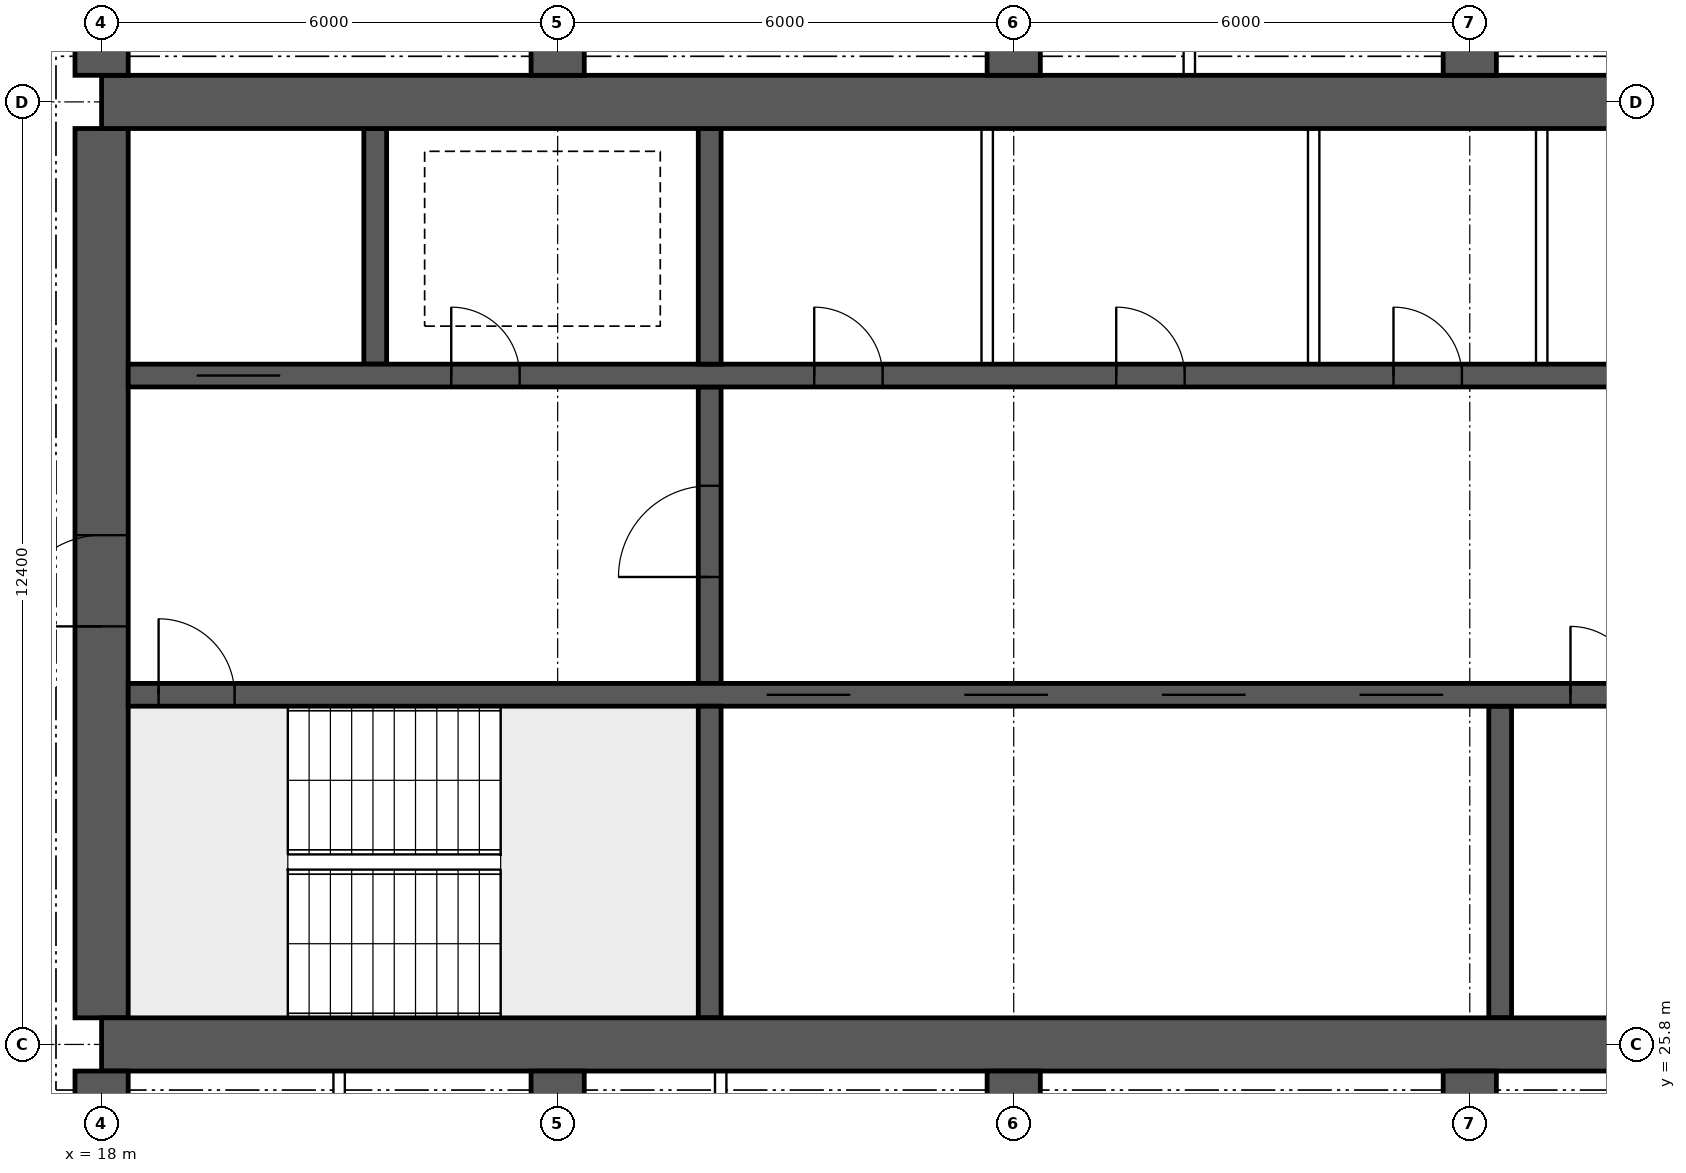
"""IFC4 building model, lengths in metres.
Left out: names, types, materials, properties, quantities, classifications, styles, units other than length and angle.
Written with IfcOpenShell. Run it as: python <this file> out.ifc"""

import sys

from ifc_helpers import new_model, si_unit, direction, frame, frame_2d, origin, place, context, subcontext, project, spatial, rectangle, extrude, element, fill, save


model = new_model("IFC4")
c1 = context("Model", 3, precision=1e-05, world=origin(), true_north=direction((0.0, 1.0)))
c2 = subcontext(c1, "Body", "Model", "MODEL_VIEW")
j1 = project(units=[si_unit("LENGTHUNIT", "METRE"), si_unit("PLANEANGLEUNIT", "RADIAN")], contexts=[c1])
p1 = place(None, origin())
s1 = spatial("IfcSite", under=j1, at=p1, CompositionType="ELEMENT")
p2 = place(p1, origin())
s2 = spatial("IfcBuilding", under=s1, at=p2, CompositionType="ELEMENT")
p3 = place(p2, frame((0.0, 0.0, 224.05)))
s3 = spatial("IfcBuildingStorey", under=s2, at=p3, CompositionType="ELEMENT", Elevation=224.05)
for number, where, z_axis, x_axis in (
    (1, (18.0, 25.8, 0.0), (0.0, 0.0, 1.0), (1.0, 0.0, 0.0)),
    (2, (18.0, 38.2, 0.0), (0.0, 0.0, 1.0), (1.0, 0.0, 0.0)),
):
    element("IfcWall", number, at=place(p3, frame(where, z_axis=z_axis, x_axis=x_axis)), inside=s3, PredefinedType="SHEAR", context=c2, shape_type="SweptSolid", body=[
        extrude(rectangle(XDim=48.0, YDim=0.7, at=frame_2d((24.0, 0.0))), origin(), (0.0, 0.0, 1.0), 3.75),
    ])
p4 = place(p3, frame((18.0, 26.15, 0.0), z_axis=(0.0, 0.0, 1.0), x_axis=(0.0, 1.0, 0.0)))
e3 = element("IfcWall", 3, at=p4, inside=s3, PredefinedType="SHEAR", context=c2, shape_type="SweptSolid", body=[
    extrude(rectangle(XDim=11.7, YDim=0.7, at=frame_2d((5.85, 0.0))), origin(), (0.0, 0.0, 1.0), 3.75),
])
p5 = place(p4, frame((5.15, 0.0, 0.0)))
e4 = element("IfcOpeningElement", 4, at=p5, cuts=e3, PredefinedType="OPENING", context=c2, shape_type="SweptSolid", body=[
    extrude(rectangle(XDim=1.2, YDim=2.1, at=frame_2d((0.6, 1.05))), frame((0.0, 0.36, 0.0), z_axis=(0.0, -1.0, 0.0), x_axis=(1.0, 0.0, 0.0)), (0.0, 0.0, 1.0), 0.72),
])
p6 = place(p3, frame((18.35, 30.4, 0.0), z_axis=(0.0, 0.0, 1.0), x_axis=(1.0, 0.0, 0.0)))
e5 = element("IfcWall", 5, at=p6, inside=s3, PredefinedType="SHEAR", context=c2, shape_type="SweptSolid", body=[
    extrude(rectangle(XDim=47.3, YDim=0.3, at=frame_2d((23.65, 0.0))), origin(), (0.0, 0.0, 1.0), 3.75),
])
p7 = place(p6, frame((0.4, 0.0, 0.0)))
e6 = element("IfcOpeningElement", 6, at=p7, cuts=e5, PredefinedType="OPENING", context=c2, shape_type="SweptSolid", body=[
    extrude(rectangle(XDim=1.0, YDim=2.1, at=frame_2d((0.5, 1.05))), frame((0.0, 0.16, 0.0), z_axis=(0.0, -1.0, 0.0), x_axis=(1.0, 0.0, 0.0)), (0.0, 0.0, 1.0), 0.32),
])
p8 = place(p6, frame((45.9, 0.0, 0.0)))
e7 = element("IfcOpeningElement", 7, at=p8, cuts=e5, PredefinedType="OPENING", context=c2, shape_type="SweptSolid", body=[
    extrude(rectangle(XDim=1.0, YDim=2.1, at=frame_2d((0.5, 1.05))), frame((0.0, 0.16, 0.0), z_axis=(0.0, -1.0, 0.0), x_axis=(1.0, 0.0, 0.0)), (0.0, 0.0, 1.0), 0.32),
])
p9 = place(p6, frame((8.4, 0.0, 0.0)))
e8 = element("IfcOpeningElement", 8, at=p9, cuts=e5, PredefinedType="OPENING", context=c2, shape_type="SweptSolid", body=[
    extrude(rectangle(XDim=1.1, YDim=2.1, at=frame_2d((0.55, 1.05))), frame((0.0, 0.16, 0.0), z_axis=(0.0, -1.0, 0.0), x_axis=(1.0, 0.0, 0.0)), (0.0, 0.0, 1.0), 0.32),
])
p10 = place(p6, frame((11.0, 0.0, 0.0)))
e9 = element("IfcOpeningElement", 9, at=p10, cuts=e5, PredefinedType="OPENING", context=c2, shape_type="SweptSolid", body=[
    extrude(rectangle(XDim=1.1, YDim=2.1, at=frame_2d((0.55, 1.05))), frame((0.0, 0.16, 0.0), z_axis=(0.0, -1.0, 0.0), x_axis=(1.0, 0.0, 0.0)), (0.0, 0.0, 1.0), 0.32),
])
p11 = place(p6, frame((13.6, 0.0, 0.0)))
e10 = element("IfcOpeningElement", 10, at=p11, cuts=e5, PredefinedType="OPENING", context=c2, shape_type="SweptSolid", body=[
    extrude(rectangle(XDim=1.1, YDim=2.1, at=frame_2d((0.55, 1.05))), frame((0.0, 0.16, 0.0), z_axis=(0.0, -1.0, 0.0), x_axis=(1.0, 0.0, 0.0)), (0.0, 0.0, 1.0), 0.32),
])
p12 = place(p6, frame((16.2, 0.0, 0.0)))
e11 = element("IfcOpeningElement", 11, at=p12, cuts=e5, PredefinedType="OPENING", context=c2, shape_type="SweptSolid", body=[
    extrude(rectangle(XDim=1.1, YDim=2.1, at=frame_2d((0.55, 1.05))), frame((0.0, 0.16, 0.0), z_axis=(0.0, -1.0, 0.0), x_axis=(1.0, 0.0, 0.0)), (0.0, 0.0, 1.0), 0.32),
])
p13 = place(p6, frame((18.975, 0.0, 0.0)))
e12 = element("IfcOpeningElement", 12, at=p13, cuts=e5, PredefinedType="OPENING", context=c2, shape_type="SweptSolid", body=[
    extrude(rectangle(XDim=0.9, YDim=2.1, at=frame_2d((0.45, 1.05))), frame((0.0, 0.16, 0.0), z_axis=(0.0, -1.0, 0.0), x_axis=(1.0, 0.0, 0.0)), (0.0, 0.0, 1.0), 0.32),
])
p14 = place(p6, frame((24.475, 0.0, 0.0)))
e13 = element("IfcOpeningElement", 13, at=p14, cuts=e5, PredefinedType="OPENING", context=c2, shape_type="SweptSolid", body=[
    extrude(rectangle(XDim=0.9, YDim=2.1, at=frame_2d((0.45, 1.05))), frame((0.0, 0.16, 0.0), z_axis=(0.0, -1.0, 0.0), x_axis=(1.0, 0.0, 0.0)), (0.0, 0.0, 1.0), 0.32),
])
p15 = place(p6, frame((30.267, 0.0, 0.0)))
e14 = element("IfcOpeningElement", 14, at=p15, cuts=e5, PredefinedType="OPENING", context=c2, shape_type="SweptSolid", body=[
    extrude(rectangle(XDim=1.1, YDim=2.1, at=frame_2d((0.55, 1.05))), frame((0.0, 0.16, 0.0), z_axis=(0.0, -1.0, 0.0), x_axis=(1.0, 0.0, 0.0)), (0.0, 0.0, 1.0), 0.32),
])
p16 = place(p6, frame((33.8, 0.0, 0.0)))
e15 = element("IfcOpeningElement", 15, at=p16, cuts=e5, PredefinedType="OPENING", context=c2, shape_type="SweptSolid", body=[
    extrude(rectangle(XDim=1.1, YDim=2.1, at=frame_2d((0.55, 1.05))), frame((0.0, 0.16, 0.0), z_axis=(0.0, -1.0, 0.0), x_axis=(1.0, 0.0, 0.0)), (0.0, 0.0, 1.0), 0.32),
])
p17 = place(p6, frame((37.333, 0.0, 0.0)))
e16 = element("IfcOpeningElement", 16, at=p17, cuts=e5, PredefinedType="OPENING", context=c2, shape_type="SweptSolid", body=[
    extrude(rectangle(XDim=1.1, YDim=2.1, at=frame_2d((0.55, 1.05))), frame((0.0, 0.16, 0.0), z_axis=(0.0, -1.0, 0.0), x_axis=(1.0, 0.0, 0.0)), (0.0, 0.0, 1.0), 0.32),
])
p18 = place(p3, frame((18.35, 34.6, 0.0), z_axis=(0.0, 0.0, 1.0), x_axis=(1.0, 0.0, 0.0)))
e17 = element("IfcWall", 17, at=p18, inside=s3, PredefinedType="SHEAR", context=c2, shape_type="SweptSolid", body=[
    extrude(rectangle(XDim=47.3, YDim=0.3, at=frame_2d((23.65, 0.0))), origin(), (0.0, 0.0, 1.0), 3.75),
])
p19 = place(p18, frame((0.9, 0.0, 0.0)))
e18 = element("IfcOpeningElement", 18, at=p19, cuts=e17, PredefinedType="OPENING", context=c2, shape_type="SweptSolid", body=[
    extrude(rectangle(XDim=1.1, YDim=2.1, at=frame_2d((0.55, 1.05))), frame((0.0, 0.16, 0.0), z_axis=(0.0, -1.0, 0.0), x_axis=(1.0, 0.0, 0.0)), (0.0, 0.0, 1.0), 0.32),
])
p20 = place(p18, frame((45.3, 0.0, 0.0)))
e19 = element("IfcOpeningElement", 19, at=p20, cuts=e17, PredefinedType="OPENING", context=c2, shape_type="SweptSolid", body=[
    extrude(rectangle(XDim=1.1, YDim=2.1, at=frame_2d((0.55, 1.05))), frame((0.0, 0.16, 0.0), z_axis=(0.0, -1.0, 0.0), x_axis=(1.0, 0.0, 0.0)), (0.0, 0.0, 1.0), 0.32),
])
p21 = place(p18, frame((4.25, 0.0, 0.0)))
e20 = element("IfcOpeningElement", 20, at=p21, cuts=e17, PredefinedType="OPENING", context=c2, shape_type="SweptSolid", body=[
    extrude(rectangle(XDim=0.9, YDim=2.1, at=frame_2d((0.45, 1.05))), frame((0.0, 0.16, 0.0), z_axis=(0.0, -1.0, 0.0), x_axis=(1.0, 0.0, 0.0)), (0.0, 0.0, 1.0), 0.32),
])
p22 = place(p18, frame((42.15, 0.0, 0.0)))
e21 = element("IfcOpeningElement", 21, at=p22, cuts=e17, PredefinedType="OPENING", context=c2, shape_type="SweptSolid", body=[
    extrude(rectangle(XDim=0.9, YDim=2.1, at=frame_2d((0.45, 1.05))), frame((0.0, 0.16, 0.0), z_axis=(0.0, -1.0, 0.0), x_axis=(1.0, 0.0, 0.0)), (0.0, 0.0, 1.0), 0.32),
])
p23 = place(p18, frame((9.025, 0.0, 0.0)))
e22 = element("IfcOpeningElement", 22, at=p23, cuts=e17, PredefinedType="OPENING", context=c2, shape_type="SweptSolid", body=[
    extrude(rectangle(XDim=0.9, YDim=2.1, at=frame_2d((0.45, 1.05))), frame((0.0, 0.16, 0.0), z_axis=(0.0, -1.0, 0.0), x_axis=(1.0, 0.0, 0.0)), (0.0, 0.0, 1.0), 0.32),
])
p24 = place(p18, frame((12.999, 0.0, 0.0)))
e23 = element("IfcOpeningElement", 23, at=p24, cuts=e17, PredefinedType="OPENING", context=c2, shape_type="SweptSolid", body=[
    extrude(rectangle(XDim=0.9, YDim=2.1, at=frame_2d((0.45, 1.05))), frame((0.0, 0.16, 0.0), z_axis=(0.0, -1.0, 0.0), x_axis=(1.0, 0.0, 0.0)), (0.0, 0.0, 1.0), 0.32),
])
p25 = place(p18, frame((16.646, 0.0, 0.0)))
e24 = element("IfcOpeningElement", 24, at=p25, cuts=e17, PredefinedType="OPENING", context=c2, shape_type="SweptSolid", body=[
    extrude(rectangle(XDim=0.9, YDim=2.1, at=frame_2d((0.45, 1.05))), frame((0.0, 0.16, 0.0), z_axis=(0.0, -1.0, 0.0), x_axis=(1.0, 0.0, 0.0)), (0.0, 0.0, 1.0), 0.32),
])
p26 = place(p18, frame((20.405, 0.0, 0.0)))
e25 = element("IfcOpeningElement", 25, at=p26, cuts=e17, PredefinedType="OPENING", context=c2, shape_type="SweptSolid", body=[
    extrude(rectangle(XDim=0.9, YDim=2.1, at=frame_2d((0.45, 1.05))), frame((0.0, 0.16, 0.0), z_axis=(0.0, -1.0, 0.0), x_axis=(1.0, 0.0, 0.0)), (0.0, 0.0, 1.0), 0.32),
])
p27 = place(p18, frame((24.811, 0.0, 0.0)))
e26 = element("IfcOpeningElement", 26, at=p27, cuts=e17, PredefinedType="OPENING", context=c2, shape_type="SweptSolid", body=[
    extrude(rectangle(XDim=0.9, YDim=2.1, at=frame_2d((0.45, 1.05))), frame((0.0, 0.16, 0.0), z_axis=(0.0, -1.0, 0.0), x_axis=(1.0, 0.0, 0.0)), (0.0, 0.0, 1.0), 0.32),
])
p28 = place(p18, frame((27.608, 0.0, 0.0)))
e27 = element("IfcOpeningElement", 27, at=p28, cuts=e17, PredefinedType="OPENING", context=c2, shape_type="SweptSolid", body=[
    extrude(rectangle(XDim=0.9, YDim=2.1, at=frame_2d((0.45, 1.05))), frame((0.0, 0.16, 0.0), z_axis=(0.0, -1.0, 0.0), x_axis=(1.0, 0.0, 0.0)), (0.0, 0.0, 1.0), 0.32),
])
p29 = place(p18, frame((29.575, 0.0, 0.0)))
e28 = element("IfcOpeningElement", 28, at=p29, cuts=e17, PredefinedType="OPENING", context=c2, shape_type="SweptSolid", body=[
    extrude(rectangle(XDim=0.9, YDim=2.1, at=frame_2d((0.45, 1.05))), frame((0.0, 0.16, 0.0), z_axis=(0.0, -1.0, 0.0), x_axis=(1.0, 0.0, 0.0)), (0.0, 0.0, 1.0), 0.32),
])
p30 = place(p18, frame((32.007, 0.0, 0.0)))
e29 = element("IfcOpeningElement", 29, at=p30, cuts=e17, PredefinedType="OPENING", context=c2, shape_type="SweptSolid", body=[
    extrude(rectangle(XDim=0.9, YDim=2.1, at=frame_2d((0.45, 1.05))), frame((0.0, 0.16, 0.0), z_axis=(0.0, -1.0, 0.0), x_axis=(1.0, 0.0, 0.0)), (0.0, 0.0, 1.0), 0.32),
])
p31 = place(p18, frame((34.742, 0.0, 0.0)))
e30 = element("IfcOpeningElement", 30, at=p31, cuts=e17, PredefinedType="OPENING", context=c2, shape_type="SweptSolid", body=[
    extrude(rectangle(XDim=0.9, YDim=2.1, at=frame_2d((0.45, 1.05))), frame((0.0, 0.16, 0.0), z_axis=(0.0, -1.0, 0.0), x_axis=(1.0, 0.0, 0.0)), (0.0, 0.0, 1.0), 0.32),
])
p32 = place(p18, frame((37.781, 0.0, 0.0)))
e31 = element("IfcOpeningElement", 31, at=p32, cuts=e17, PredefinedType="OPENING", context=c2, shape_type="SweptSolid", body=[
    extrude(rectangle(XDim=0.9, YDim=2.1, at=frame_2d((0.45, 1.05))), frame((0.0, 0.16, 0.0), z_axis=(0.0, -1.0, 0.0), x_axis=(1.0, 0.0, 0.0)), (0.0, 0.0, 1.0), 0.32),
])
p33 = place(p3, frame((26.0, 26.15, 0.0), z_axis=(0.0, 0.0, 1.0), x_axis=(0.0, 1.0, 0.0)))
e32 = element("IfcWall", 32, at=p33, inside=s3, PredefinedType="SHEAR", context=c2, shape_type="SweptSolid", body=[
    extrude(rectangle(XDim=4.1, YDim=0.3, at=frame_2d((2.05, 0.0))), origin(), (0.0, 0.0, 1.0), 3.75),
])
p34 = place(p3, frame((26.0, 30.55, 0.0), z_axis=(0.0, 0.0, 1.0), x_axis=(0.0, 1.0, 0.0)))
e33 = element("IfcWall", 33, at=p34, inside=s3, PredefinedType="SHEAR", context=c2, shape_type="SweptSolid", body=[
    extrude(rectangle(XDim=3.9, YDim=0.3, at=frame_2d((1.95, 0.0))), origin(), (0.0, 0.0, 1.0), 3.75),
])
p35 = place(p34, frame((1.4, 0.0, 0.0)))
e34 = element("IfcOpeningElement", 34, at=p35, cuts=e33, PredefinedType="OPENING", context=c2, shape_type="SweptSolid", body=[
    extrude(rectangle(XDim=1.2, YDim=2.1, at=frame_2d((0.6, 1.05))), frame((0.0, 0.16, 0.0), z_axis=(0.0, -1.0, 0.0), x_axis=(1.0, 0.0, 0.0)), (0.0, 0.0, 1.0), 0.32),
])
for number, where, z_axis, x_axis in (
    (35, (21.6, 34.75, 0.0), (0.0, 0.0, 1.0), (0.0, 1.0, 0.0)),
    (36, (26.0, 34.75, 0.0), (0.0, 0.0, 1.0), (0.0, 1.0, 0.0)),
):
    element("IfcWall", number, at=place(p3, frame(where, z_axis=z_axis, x_axis=x_axis)), inside=s3, PredefinedType="SHEAR", context=c2, shape_type="SweptSolid", body=[
        extrude(rectangle(XDim=3.1, YDim=0.3, at=frame_2d((1.55, 0.0))), origin(), (0.0, 0.0, 1.0), 3.75),
    ])
p36 = place(p3, frame((36.4, 26.15, 0.0), z_axis=(0.0, 0.0, 1.0), x_axis=(0.0, 1.0, 0.0)))
e37 = element("IfcWall", 37, at=p36, inside=s3, PredefinedType="SHEAR", context=c2, shape_type="SweptSolid", body=[
    extrude(rectangle(XDim=4.1, YDim=0.3, at=frame_2d((2.05, 0.0))), origin(), (0.0, 0.0, 1.0), 3.75),
])
for number, where, z_axis, x_axis in (
    (38, (18.0, 18.4, 0.0), (0.0, 0.0, 1.0), (0.0, 1.0, 0.0)),
    (39, (18.0, 38.55, 0.0), (0.0, 0.0, 1.0), (0.0, 1.0, 0.0)),
    (40, (24.0, 18.4, 0.0), (0.0, 0.0, 1.0), (0.0, 1.0, 0.0)),
    (41, (24.0, 38.55, 0.0), (0.0, 0.0, 1.0), (0.0, 1.0, 0.0)),
    (42, (30.0, 18.4, 0.0), (0.0, 0.0, 1.0), (0.0, 1.0, 0.0)),
    (43, (30.0, 38.55, 0.0), (0.0, 0.0, 1.0), (0.0, 1.0, 0.0)),
    (44, (36.0, 18.4, 0.0), (0.0, 0.0, 1.0), (0.0, 1.0, 0.0)),
    (45, (36.0, 38.55, 0.0), (0.0, 0.0, 1.0), (0.0, 1.0, 0.0)),
):
    element("IfcWall", number, at=place(p3, frame(where, z_axis=z_axis, x_axis=x_axis)), inside=s3, PredefinedType="SHEAR", context=c2, shape_type="SweptSolid", body=[
        extrude(rectangle(XDim=7.05, YDim=0.7, at=frame_2d((3.525, 0.0))), origin(), (0.0, 0.0, 1.0), 3.75),
    ])
for number, where, z_axis, x_axis in (
    (46, (29.651, 34.75, 0.0), (0.0, 0.0, 1.0), (0.0, 1.0, 0.0)),
    (47, (33.946, 34.75, 0.0), (0.0, 0.0, 1.0), (0.0, 1.0, 0.0)),
    (48, (36.946, 34.75, 0.0), (0.0, 0.0, 1.0), (0.0, 1.0, 0.0)),
):
    element("IfcWall", number, at=place(p3, frame(where, z_axis=z_axis, x_axis=x_axis)), inside=s3, PredefinedType="SOLIDWALL", context=c2, shape_type="SweptSolid", body=[
        extrude(rectangle(XDim=3.1, YDim=0.15, at=frame_2d((1.55, 0.0))), origin(), (0.0, 0.0, 1.0), 3.5),
    ])
for number, where, z_axis, x_axis in (
    (49, (21.125, 18.5, 0.0), (0.0, 0.0, 1.0), (0.0, 1.0, 0.0)),
    (50, (26.145, 18.5, 0.0), (0.0, 0.0, 1.0), (0.0, 1.0, 0.0)),
    (51, (32.31, 38.55, 0.0), (0.0, 0.0, 1.0), (0.0, 1.0, 0.0)),
):
    element("IfcWall", number, at=place(p3, frame(where, z_axis=z_axis, x_axis=x_axis)), inside=s3, PredefinedType="PARTITIONING", context=c2, shape_type="SweptSolid", body=[
        extrude(rectangle(XDim=6.95, YDim=0.15, at=frame_2d((3.475, 0.0))), origin(), (0.0, 0.0, 1.0), 3.5),
    ])
p37 = place(p5, origin())
e52 = element("IfcDoor", 52, at=p37, inside=s3, OperationType="SINGLE_SWING_LEFT", PredefinedType="DOOR", context=c2, shape_type="SweptSolid", body=[
    extrude(rectangle(XDim=1.2, YDim=2.1, at=frame_2d((0.6, 1.05))), frame((0.0, 0.025, 0.0), z_axis=(0.0, -1.0, 0.0), x_axis=(1.0, 0.0, 0.0)), (0.0, 0.0, 1.0), 0.05),
])
fill(e4, e52)
p38 = place(p7, origin())
e53 = element("IfcDoor", 53, at=p38, inside=s3, OperationType="SINGLE_SWING_LEFT", PredefinedType="DOOR", context=c2, shape_type="SweptSolid", body=[
    extrude(rectangle(XDim=1.0, YDim=2.1, at=frame_2d((0.5, 1.05))), frame((0.0, 0.025, 0.0), z_axis=(0.0, -1.0, 0.0), x_axis=(1.0, 0.0, 0.0)), (0.0, 0.0, 1.0), 0.05),
])
fill(e6, e53)
p39 = place(p19, origin())
e54 = element("IfcDoor", 54, at=p39, inside=s3, OperationType="DOUBLE_DOOR_SLIDING", PredefinedType="DOOR", context=c2, shape_type="SweptSolid", body=[
    extrude(rectangle(XDim=1.1, YDim=2.1, at=frame_2d((0.55, 1.05))), frame((0.0, 0.025, 0.0), z_axis=(0.0, -1.0, 0.0), x_axis=(1.0, 0.0, 0.0)), (0.0, 0.0, 1.0), 0.05),
])
fill(e18, e54)
p40 = place(p21, origin())
e55 = element("IfcDoor", 55, at=p40, inside=s3, OperationType="SINGLE_SWING_LEFT", PredefinedType="DOOR", context=c2, shape_type="SweptSolid", body=[
    extrude(rectangle(XDim=0.9, YDim=2.1, at=frame_2d((0.45, 1.05))), frame((0.0, 0.025, 0.0), z_axis=(0.0, -1.0, 0.0), x_axis=(1.0, 0.0, 0.0)), (0.0, 0.0, 1.0), 0.05),
])
fill(e20, e55)
p41 = place(p35, origin())
e56 = element("IfcDoor", 56, at=p41, inside=s3, OperationType="SINGLE_SWING_LEFT", PredefinedType="DOOR", context=c2, shape_type="SweptSolid", body=[
    extrude(rectangle(XDim=1.2, YDim=2.1, at=frame_2d((0.6, 1.05))), frame((0.0, 0.025, 0.0), z_axis=(0.0, -1.0, 0.0), x_axis=(1.0, 0.0, 0.0)), (0.0, 0.0, 1.0), 0.05),
])
fill(e34, e56)
p42 = place(p23, origin())
e57 = element("IfcDoor", 57, at=p42, inside=s3, OperationType="SINGLE_SWING_LEFT", PredefinedType="DOOR", context=c2, shape_type="SweptSolid", body=[
    extrude(rectangle(XDim=0.9, YDim=2.1, at=frame_2d((0.45, 1.05))), frame((0.0, 0.025, 0.0), z_axis=(0.0, -1.0, 0.0), x_axis=(1.0, 0.0, 0.0)), (0.0, 0.0, 1.0), 0.05),
])
fill(e22, e57)
p43 = place(p24, origin())
e58 = element("IfcDoor", 58, at=p43, inside=s3, OperationType="SINGLE_SWING_LEFT", PredefinedType="DOOR", context=c2, shape_type="SweptSolid", body=[
    extrude(rectangle(XDim=0.9, YDim=2.1, at=frame_2d((0.45, 1.05))), frame((0.0, 0.025, 0.0), z_axis=(0.0, -1.0, 0.0), x_axis=(1.0, 0.0, 0.0)), (0.0, 0.0, 1.0), 0.05),
])
fill(e23, e58)
p44 = place(p25, origin())
e59 = element("IfcDoor", 59, at=p44, inside=s3, OperationType="SINGLE_SWING_LEFT", PredefinedType="DOOR", context=c2, shape_type="SweptSolid", body=[
    extrude(rectangle(XDim=0.9, YDim=2.1, at=frame_2d((0.45, 1.05))), frame((0.0, 0.025, 0.0), z_axis=(0.0, -1.0, 0.0), x_axis=(1.0, 0.0, 0.0)), (0.0, 0.0, 1.0), 0.05),
])
fill(e24, e59)
p45 = place(p9, origin())
e60 = element("IfcDoor", 60, at=p45, inside=s3, OperationType="DOUBLE_DOOR_SLIDING", PredefinedType="DOOR", context=c2, shape_type="SweptSolid", body=[
    extrude(rectangle(XDim=1.1, YDim=2.1, at=frame_2d((0.55, 1.05))), frame((0.0, 0.025, 0.0), z_axis=(0.0, -1.0, 0.0), x_axis=(1.0, 0.0, 0.0)), (0.0, 0.0, 1.0), 0.05),
])
fill(e8, e60)
p46 = place(p10, origin())
e61 = element("IfcDoor", 61, at=p46, inside=s3, OperationType="DOUBLE_DOOR_SLIDING", PredefinedType="DOOR", context=c2, shape_type="SweptSolid", body=[
    extrude(rectangle(XDim=1.1, YDim=2.1, at=frame_2d((0.55, 1.05))), frame((0.0, 0.025, 0.0), z_axis=(0.0, -1.0, 0.0), x_axis=(1.0, 0.0, 0.0)), (0.0, 0.0, 1.0), 0.05),
])
fill(e9, e61)
p47 = place(p11, origin())
e62 = element("IfcDoor", 62, at=p47, inside=s3, OperationType="DOUBLE_DOOR_SLIDING", PredefinedType="DOOR", context=c2, shape_type="SweptSolid", body=[
    extrude(rectangle(XDim=1.1, YDim=2.1, at=frame_2d((0.55, 1.05))), frame((0.0, 0.025, 0.0), z_axis=(0.0, -1.0, 0.0), x_axis=(1.0, 0.0, 0.0)), (0.0, 0.0, 1.0), 0.05),
])
fill(e10, e62)
p48 = place(p12, origin())
e63 = element("IfcDoor", 63, at=p48, inside=s3, OperationType="DOUBLE_DOOR_SLIDING", PredefinedType="DOOR", context=c2, shape_type="SweptSolid", body=[
    extrude(rectangle(XDim=1.1, YDim=2.1, at=frame_2d((0.55, 1.05))), frame((0.0, 0.025, 0.0), z_axis=(0.0, -1.0, 0.0), x_axis=(1.0, 0.0, 0.0)), (0.0, 0.0, 1.0), 0.05),
])
fill(e11, e63)
p49 = place(p13, origin())
e64 = element("IfcDoor", 64, at=p49, inside=s3, OperationType="SINGLE_SWING_LEFT", PredefinedType="DOOR", context=c2, shape_type="SweptSolid", body=[
    extrude(rectangle(XDim=0.9, YDim=2.1, at=frame_2d((0.45, 1.05))), frame((0.0, 0.025, 0.0), z_axis=(0.0, -1.0, 0.0), x_axis=(1.0, 0.0, 0.0)), (0.0, 0.0, 1.0), 0.05),
])
fill(e12, e64)
save(model, sys.argv[1])
